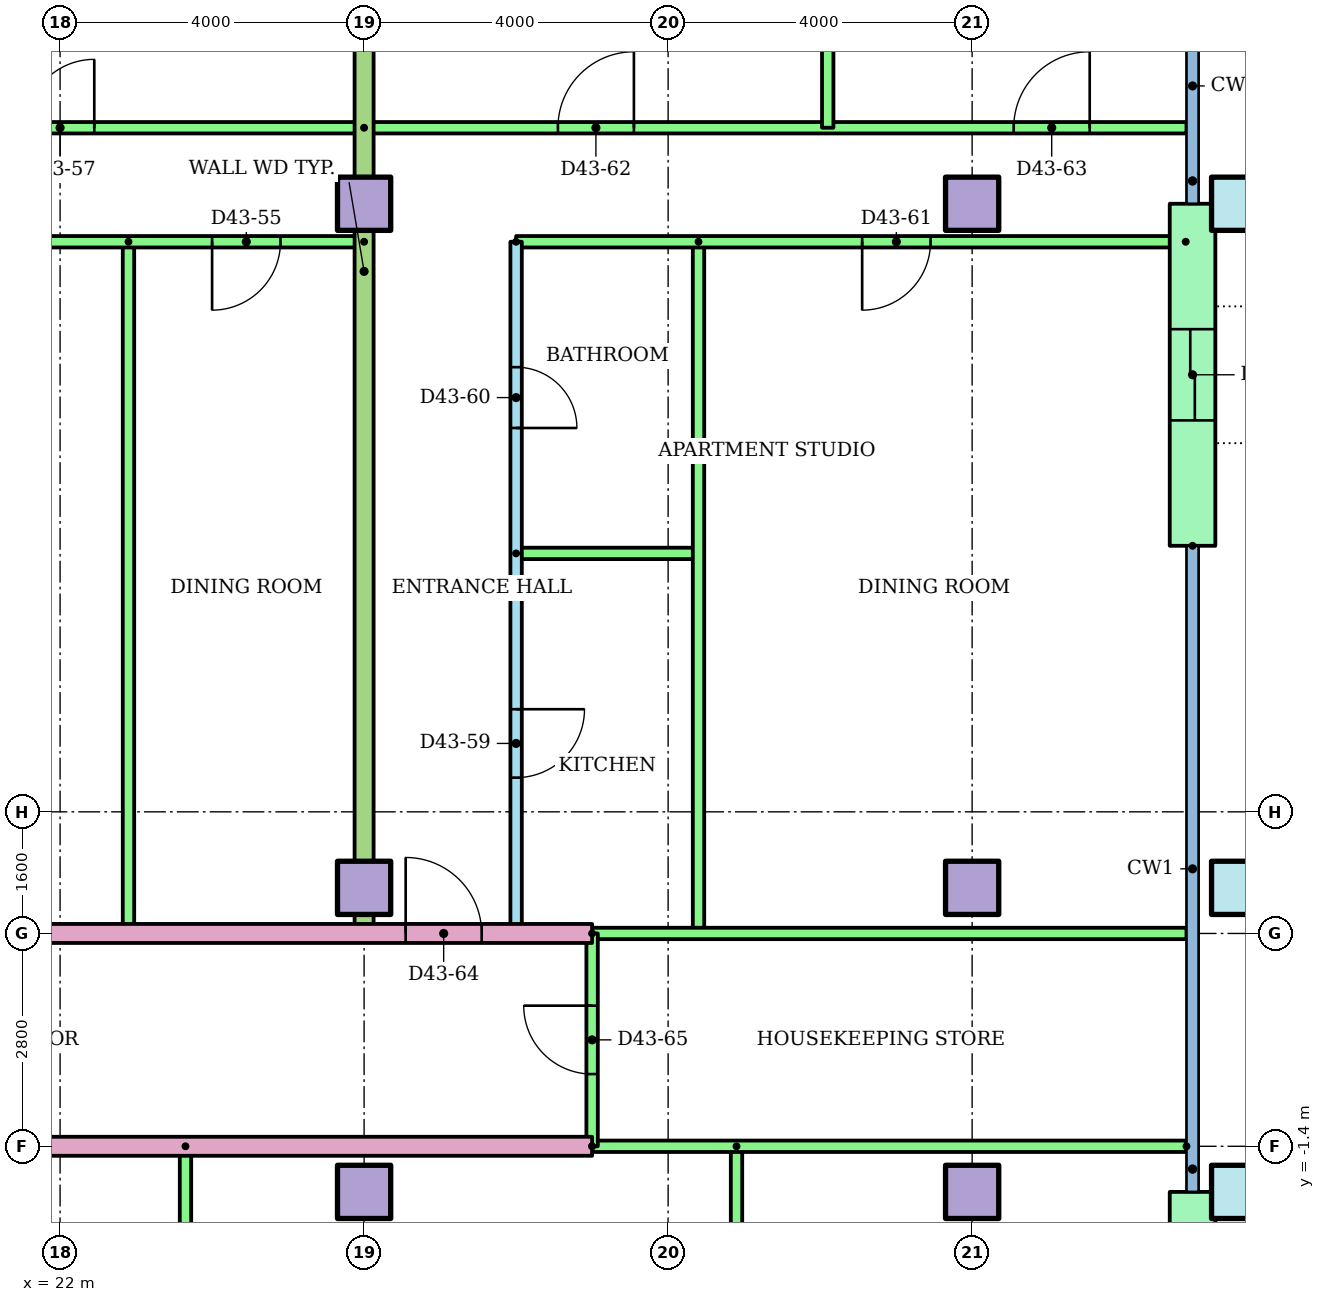
"""IFC4 building model, lengths in metres.
Left out: names, types, materials, properties, quantities, classifications, styles, units other than length and angle.
Written with IfcOpenShell. Run it as: python <this file> out.ifc"""

import sys

from ifc_helpers import new_model, si_unit, direction, frame, frame_2d, origin, origin_2d, place, context, subcontext, project, spatial, rectangle, hollow_rectangle, extrude, element, fill, save


model = new_model("IFC4")
c1 = context("Model", 3, precision=1e-05, world=origin(), true_north=direction((0.0, 1.0)))
c2 = subcontext(c1, "Body", "Model", "MODEL_VIEW")
j1 = project(units=[si_unit("LENGTHUNIT", "METRE"), si_unit("PLANEANGLEUNIT", "RADIAN")], contexts=[c1])
p1 = place(None, origin())
s1 = spatial("IfcSite", under=j1, at=p1, CompositionType="ELEMENT")
p2 = place(p1, origin())
s2 = spatial("IfcBuilding", under=s1, at=p2, CompositionType="ELEMENT")
p3 = place(p2, frame((0.0, 0.0, 168.5)))
s3 = spatial("IfcBuildingStorey", under=s2, at=p3, CompositionType="ELEMENT", Elevation=168.5)
for number, where in (
    (1, (26.0, -2.0, 0.0)),
    (2, (34.0, -2.0, 0.0)),
):
    element("IfcColumn", number, at=place(p3, frame(where)), inside=s3, PredefinedType="COLUMN", context=c2, shape_type="SweptSolid", body=[
        extrude(rectangle(XDim=0.7, YDim=0.7, at=origin_2d()), origin(), (0.0, 0.0, 1.0), 3.2),
    ])
p4 = place(p3, frame((37.5, -2.0, 0.0)))
e3 = element("IfcColumn", 3, at=p4, inside=s3, PredefinedType="COLUMN", context=c2, shape_type="SweptSolid", body=[
    extrude(hollow_rectangle(XDim=0.7, YDim=0.7, WallThickness=0.036, at=origin_2d()), origin(), (0.0, 0.0, 1.0), 3.2),
])
for number, where in (
    (4, (26.0, 2.0, 0.0)),
    (5, (34.0, 2.0, 0.0)),
):
    element("IfcColumn", number, at=place(p3, frame(where)), inside=s3, PredefinedType="COLUMN", context=c2, shape_type="SweptSolid", body=[
        extrude(rectangle(XDim=0.7, YDim=0.7, at=origin_2d()), origin(), (0.0, 0.0, 1.0), 3.2),
    ])
p5 = place(p3, frame((37.5, 2.0, 0.0)))
e6 = element("IfcColumn", 6, at=p5, inside=s3, PredefinedType="COLUMN", context=c2, shape_type="SweptSolid", body=[
    extrude(hollow_rectangle(XDim=0.7, YDim=0.7, WallThickness=0.036, at=origin_2d()), origin(), (0.0, 0.0, 1.0), 3.2),
])
for number, where in (
    (7, (26.0, 11.0, 0.0)),
    (8, (34.0, 11.0, 0.0)),
):
    element("IfcColumn", number, at=place(p3, frame(where)), inside=s3, PredefinedType="COLUMN", context=c2, shape_type="SweptSolid", body=[
        extrude(rectangle(XDim=0.7, YDim=0.7, at=origin_2d()), origin(), (0.0, 0.0, 1.0), 3.2),
    ])
p6 = place(p3, frame((37.5, 11.0, 0.0)))
e9 = element("IfcColumn", 9, at=p6, inside=s3, PredefinedType="COLUMN", context=c2, shape_type="SweptSolid", body=[
    extrude(hollow_rectangle(XDim=0.7, YDim=0.7, WallThickness=0.036, at=origin_2d()), origin(), (0.0, 0.0, 1.0), 3.2),
])
p7 = place(p3, frame((36.9, -5.7, 0.0), z_axis=(0.0, 0.0, 1.0), x_axis=(0.0, 1.0, 0.0)))
e10 = element("IfcWall", 10, at=p7, inside=s3, PredefinedType="STANDARD", context=c2, shape_type="SweptSolid", body=[
    extrude(rectangle(XDim=3.7, YDim=0.6, at=frame_2d((1.85, 0.0))), origin(), (0.0, 0.0, 1.0), 2.92),
])
p8 = place(p7, frame((1.25, 0.0, 0.0)))
e11 = element("IfcOpeningElement", 11, at=p8, cuts=e10, PredefinedType="OPENING", context=c2, shape_type="SweptSolid", body=[
    extrude(rectangle(XDim=1.2, YDim=2.1, at=frame_2d((0.6, 1.05))), frame((0.0, 0.31, 0.0), z_axis=(0.0, -1.0, 0.0), x_axis=(1.0, 0.0, 0.0)), (0.0, 0.0, 1.0), 0.62),
])
p9 = place(p3, frame((36.9, 6.5, 0.0), z_axis=(0.0, 0.0, 1.0), x_axis=(0.0, 1.0, 0.0)))
e12 = element("IfcWall", 12, at=p9, inside=s3, PredefinedType="STANDARD", context=c2, shape_type="SweptSolid", body=[
    extrude(rectangle(XDim=4.5, YDim=0.6, at=frame_2d((2.25, 0.0))), origin(), (0.0, 0.0, 1.0), 2.92),
])
p10 = place(p9, frame((1.65, 0.0, 0.0)))
e13 = element("IfcOpeningElement", 13, at=p10, cuts=e12, PredefinedType="OPENING", context=c2, shape_type="SweptSolid", body=[
    extrude(rectangle(XDim=1.2, YDim=2.1, at=frame_2d((0.6, 1.05))), frame((0.0, 0.31, 0.0), z_axis=(0.0, -1.0, 0.0), x_axis=(1.0, 0.0, 0.0)), (0.0, 0.0, 1.0), 0.62),
])
for number, where, z_axis, x_axis in (
    (14, (23.65, -1.4, 0.0), (0.0, 0.0, 1.0), (0.0, -1.0, 0.0)),
    (15, (30.9, -1.4, 0.0), (0.0, 0.0, 1.0), (0.0, -1.0, 0.0)),
):
    element("IfcWall", number, at=place(p3, frame(where, z_axis=z_axis, x_axis=x_axis)), inside=s3, PredefinedType="PARTITIONING", context=c2, shape_type="SweptSolid", body=[
        extrude(rectangle(XDim=6.7, YDim=0.15, at=frame_2d((3.35, 0.0))), origin(), (0.0, 0.0, 1.0), 2.4),
    ])
p11 = place(p3, frame((29.0, -1.4, 0.0), z_axis=(0.0, 0.0, 1.0), x_axis=(-1.0, 0.0, 0.0)))
e16 = element("IfcWall", 16, at=p11, inside=s3, PredefinedType="PARTITIONING", context=c2, shape_type="SweptSolid", body=[
    extrude(rectangle(XDim=15.0, YDim=0.25, at=frame_2d((7.5, 0.0))), origin(), (0.0, 0.0, 1.0), 2.4),
])
p12 = place(p3, frame((36.82, -1.4, 0.0), z_axis=(0.0, 0.0, 1.0), x_axis=(-1.0, 0.0, 0.0)))
e17 = element("IfcWall", 17, at=p12, inside=s3, PredefinedType="PARTITIONING", context=c2, shape_type="SweptSolid", body=[
    extrude(rectangle(XDim=7.82, YDim=0.15, at=frame_2d((3.91, 0.0))), origin(), (0.0, 0.0, 1.0), 2.4),
])
p13 = place(p3, frame((22.9, 10.5, 0.0), z_axis=(0.0, 0.0, 1.0), x_axis=(0.0, -1.0, 0.0)))
e18 = element("IfcWall", 18, at=p13, inside=s3, PredefinedType="PARTITIONING", context=c2, shape_type="SweptSolid", body=[
    extrude(rectangle(XDim=9.1, YDim=0.15, at=frame_2d((4.55, 0.0))), origin(), (0.0, 0.0, 1.0), 2.4),
])
p14 = place(p3, frame((26.0, 10.5, 0.0), z_axis=(0.0, 0.0, 1.0), x_axis=(-1.0, 0.0, 0.0)))
e19 = element("IfcWall", 19, at=p14, inside=s3, PredefinedType="PARTITIONING", context=c2, shape_type="SweptSolid", body=[
    extrude(rectangle(XDim=10.0, YDim=0.15, at=frame_2d((5.0, 0.0))), origin(), (0.0, 0.0, 1.0), 2.4),
])
p15 = place(p14, frame((4.9, 0.0, 0.0)))
e20 = element("IfcOpeningElement", 20, at=p15, cuts=e19, PredefinedType="OPENING", context=c2, shape_type="SweptSolid", body=[
    extrude(rectangle(XDim=0.9, YDim=2.1, at=frame_2d((0.45, 1.05))), frame((0.0, 0.085, 0.0), z_axis=(0.0, -1.0, 0.0), x_axis=(1.0, 0.0, 0.0)), (0.0, 0.0, 1.0), 0.17),
])
p16 = place(p14, frame((1.1, 0.0, 0.0)))
e21 = element("IfcOpeningElement", 21, at=p16, cuts=e19, PredefinedType="OPENING", context=c2, shape_type="SweptSolid", body=[
    extrude(rectangle(XDim=0.9, YDim=2.1, at=frame_2d((0.45, 1.05))), frame((0.0, 0.085, 0.0), z_axis=(0.0, -1.0, 0.0), x_axis=(1.0, 0.0, 0.0)), (0.0, 0.0, 1.0), 0.17),
])
p17 = place(p3, frame((14.0, 12.0, 0.0)))
e22 = element("IfcWall", 22, at=p17, inside=s3, PredefinedType="PARTITIONING", context=c2, shape_type="SweptSolid", body=[
    extrude(rectangle(XDim=12.0, YDim=0.15, at=frame_2d((6.0, 0.0))), origin(), (0.0, 0.0, 1.0), 2.4),
])
p18 = place(p17, frame((1.5, 0.0, 0.0)))
e23 = element("IfcOpeningElement", 23, at=p18, cuts=e22, PredefinedType="OPENING", context=c2, shape_type="SweptSolid", body=[
    extrude(rectangle(XDim=1.0, YDim=2.1, at=frame_2d((0.5, 1.05))), frame((0.0, 0.085, 0.0), z_axis=(0.0, -1.0, 0.0), x_axis=(1.0, 0.0, 0.0)), (0.0, 0.0, 1.0), 0.17),
])
p19 = place(p17, frame((7.55, 0.0, 0.0)))
e24 = element("IfcOpeningElement", 24, at=p19, cuts=e22, PredefinedType="OPENING", context=c2, shape_type="SweptSolid", body=[
    extrude(rectangle(XDim=0.9, YDim=2.1, at=frame_2d((0.45, 1.05))), frame((0.0, 0.085, 0.0), z_axis=(0.0, -1.0, 0.0), x_axis=(1.0, 0.0, 0.0)), (0.0, 0.0, 1.0), 0.17),
])
p20 = place(p3, frame((28.0, 10.5, 0.0), z_axis=(0.0, 0.0, 1.0), x_axis=(0.0, -1.0, 0.0)))
e25 = element("IfcWall", 25, at=p20, inside=s3, PredefinedType="PARTITIONING", context=c2, shape_type="SweptSolid", body=[
    extrude(rectangle(XDim=9.1, YDim=0.15, at=frame_2d((4.55, 0.0))), origin(), (0.0, 0.0, 1.0), 2.4),
])
p21 = place(p20, frame((6.15, 0.0, 0.0)))
e26 = element("IfcOpeningElement", 26, at=p21, cuts=e25, PredefinedType="OPENING", context=c2, shape_type="SweptSolid", body=[
    extrude(rectangle(XDim=0.9, YDim=2.1, at=frame_2d((0.45, 1.05))), frame((0.0, 0.085, 0.0), z_axis=(0.0, -1.0, 0.0), x_axis=(1.0, 0.0, 0.0)), (0.0, 0.0, 1.0), 0.17),
])
p22 = place(p20, frame((1.65, 0.0, 0.0)))
e27 = element("IfcOpeningElement", 27, at=p22, cuts=e25, PredefinedType="OPENING", context=c2, shape_type="SweptSolid", body=[
    extrude(rectangle(XDim=0.8, YDim=2.1, at=frame_2d((0.4, 1.05))), frame((0.0, 0.085, 0.0), z_axis=(0.0, -1.0, 0.0), x_axis=(1.0, 0.0, 0.0)), (0.0, 0.0, 1.0), 0.17),
])
p23 = place(p3, frame((28.0, 6.4, 0.0)))
e28 = element("IfcWall", 28, at=p23, inside=s3, PredefinedType="PARTITIONING", context=c2, shape_type="SweptSolid", body=[
    extrude(rectangle(XDim=2.4, YDim=0.15, at=frame_2d((1.2, 0.0))), origin(), (0.0, 0.0, 1.0), 2.4),
])
p24 = place(p3, frame((30.4, 10.5, 0.0), z_axis=(0.0, 0.0, 1.0), x_axis=(0.0, -1.0, 0.0)))
e29 = element("IfcWall", 29, at=p24, inside=s3, PredefinedType="PARTITIONING", context=c2, shape_type="SweptSolid", body=[
    extrude(rectangle(XDim=9.1, YDim=0.15, at=frame_2d((4.55, 0.0))), origin(), (0.0, 0.0, 1.0), 2.4),
])
p25 = place(p3, frame((36.81, 10.5, 0.0), z_axis=(0.0, 0.0, 1.0), x_axis=(-1.0, 0.0, 0.0)))
e30 = element("IfcWall", 30, at=p25, inside=s3, PredefinedType="PARTITIONING", context=c2, shape_type="SweptSolid", body=[
    extrude(rectangle(XDim=8.81, YDim=0.15, at=frame_2d((4.405, 0.0))), origin(), (0.0, 0.0, 1.0), 2.4),
])
p26 = place(p25, frame((3.357, 0.0, 0.0)))
e31 = element("IfcOpeningElement", 31, at=p26, cuts=e30, PredefinedType="OPENING", context=c2, shape_type="SweptSolid", body=[
    extrude(rectangle(XDim=0.9, YDim=2.1, at=frame_2d((0.45, 1.05))), frame((0.0, 0.085, 0.0), z_axis=(0.0, -1.0, 0.0), x_axis=(1.0, 0.0, 0.0)), (0.0, 0.0, 1.0), 0.17),
])
p27 = place(p3, frame((26.0, 12.0, 0.0)))
e32 = element("IfcWall", 32, at=p27, inside=s3, PredefinedType="PARTITIONING", context=c2, shape_type="SweptSolid", body=[
    extrude(rectangle(XDim=10.82, YDim=0.15, at=frame_2d((5.41, 0.0))), origin(), (0.0, 0.0, 1.0), 2.4),
])
p28 = place(p27, frame((2.55, 0.0, 0.0)))
e33 = element("IfcOpeningElement", 33, at=p28, cuts=e32, PredefinedType="OPENING", context=c2, shape_type="SweptSolid", body=[
    extrude(rectangle(XDim=1.0, YDim=2.1, at=frame_2d((0.5, 1.05))), frame((0.0, 0.085, 0.0), z_axis=(0.0, -1.0, 0.0), x_axis=(1.0, 0.0, 0.0)), (0.0, 0.0, 1.0), 0.17),
])
p29 = place(p27, frame((8.547, 0.0, 0.0)))
e34 = element("IfcOpeningElement", 34, at=p29, cuts=e32, PredefinedType="OPENING", context=c2, shape_type="SweptSolid", body=[
    extrude(rectangle(XDim=1.0, YDim=2.1, at=frame_2d((0.5, 1.05))), frame((0.0, 0.085, 0.0), z_axis=(0.0, -1.0, 0.0), x_axis=(1.0, 0.0, 0.0)), (0.0, 0.0, 1.0), 0.17),
])
p30 = place(p3, frame((32.1, 17.02, 0.0), z_axis=(0.0, 0.0, 1.0), x_axis=(0.0, -1.0, 0.0)))
e35 = element("IfcWall", 35, at=p30, inside=s3, PredefinedType="PARTITIONING", context=c2, shape_type="SweptSolid", body=[
    extrude(rectangle(XDim=5.02, YDim=0.15, at=frame_2d((2.51, 0.0))), origin(), (0.0, 0.0, 1.0), 2.4),
])
p31 = place(p3, frame((26.0, 18.821, 0.0), z_axis=(0.0, 0.0, 1.0), x_axis=(0.0, -1.0, 0.0)))
e36 = element("IfcWall", 36, at=p31, inside=s3, PredefinedType="PARTITIONING", context=c2, shape_type="SweptSolid", body=[
    extrude(rectangle(XDim=17.421, YDim=0.25, at=frame_2d((8.71, 0.0))), origin(), (0.0, 0.0, 1.0), 2.4),
])
p32 = place(p3, frame((14.0, 1.4, 0.0)))
e37 = element("IfcWall", 37, at=p32, inside=s3, PredefinedType="PARTITIONING", context=c2, shape_type="SweptSolid", body=[
    extrude(rectangle(XDim=15.0, YDim=0.25, at=frame_2d((7.5, 0.0))), origin(), (0.0, 0.0, 1.0), 2.4),
])
p33 = place(p32, frame((0.5, 0.0, 0.0)))
e38 = element("IfcOpeningElement", 38, at=p33, cuts=e37, PredefinedType="OPENING", context=c2, shape_type="SweptSolid", body=[
    extrude(rectangle(XDim=1.0, YDim=2.1, at=frame_2d((0.5, 1.05))), frame((0.0, 0.135, 0.0), z_axis=(0.0, -1.0, 0.0), x_axis=(1.0, 0.0, 0.0)), (0.0, 0.0, 1.0), 0.27),
])
p34 = place(p32, frame((12.547, 0.0, 0.0)))
e39 = element("IfcOpeningElement", 39, at=p34, cuts=e37, PredefinedType="OPENING", context=c2, shape_type="SweptSolid", body=[
    extrude(rectangle(XDim=1.0, YDim=2.1, at=frame_2d((0.5, 1.05))), frame((0.0, 0.135, 0.0), z_axis=(0.0, -1.0, 0.0), x_axis=(1.0, 0.0, 0.0)), (0.0, 0.0, 1.0), 0.27),
])
p35 = place(p3, frame((29.0, 1.4, 0.0)))
e40 = element("IfcWall", 40, at=p35, inside=s3, PredefinedType="PARTITIONING", context=c2, shape_type="SweptSolid", body=[
    extrude(rectangle(XDim=7.82, YDim=0.15, at=frame_2d((3.91, 0.0))), origin(), (0.0, 0.0, 1.0), 2.4),
])
p36 = place(p3, frame((29.0, -1.4, 0.0), z_axis=(0.0, 0.0, 1.0), x_axis=(0.0, 1.0, 0.0)))
e41 = element("IfcWall", 41, at=p36, inside=s3, PredefinedType="PARTITIONING", context=c2, shape_type="SweptSolid", body=[
    extrude(rectangle(XDim=2.8, YDim=0.15, at=frame_2d((1.4, 0.0))), origin(), (0.0, 0.0, 1.0), 2.4),
])
p37 = place(p36, frame((0.95, 0.0, 0.0)))
e42 = element("IfcOpeningElement", 42, at=p37, cuts=e41, PredefinedType="OPENING", context=c2, shape_type="SweptSolid", body=[
    extrude(rectangle(XDim=0.9, YDim=2.1, at=frame_2d((0.45, 1.05))), frame((0.0, 0.085, 0.0), z_axis=(0.0, -1.0, 0.0), x_axis=(1.0, 0.0, 0.0)), (0.0, 0.0, 1.0), 0.17),
])
p38 = place(p16, origin())
e43 = element("IfcDoor", 43, at=p38, inside=s3, OperationType="SINGLE_SWING_RIGHT", PredefinedType="DOOR", context=c2, shape_type="SweptSolid", body=[
    extrude(rectangle(XDim=0.9, YDim=2.1, at=frame_2d((0.45, 1.05))), frame((0.0, 0.025, 0.0), z_axis=(0.0, -1.0, 0.0), x_axis=(1.0, 0.0, 0.0)), (0.0, 0.0, 1.0), 0.05),
])
fill(e21, e43)
p39 = place(p19, origin())
e44 = element("IfcDoor", 44, at=p39, inside=s3, OperationType="SINGLE_SWING_RIGHT", PredefinedType="DOOR", context=c2, shape_type="SweptSolid", body=[
    extrude(rectangle(XDim=0.9, YDim=2.1, at=frame_2d((0.45, 1.05))), frame((0.0, 0.025, 0.0), z_axis=(0.0, -1.0, 0.0), x_axis=(1.0, 0.0, 0.0)), (0.0, 0.0, 1.0), 0.05),
])
fill(e24, e44)
p40 = place(p21, origin())
e45 = element("IfcDoor", 45, at=p40, inside=s3, OperationType="SINGLE_SWING_LEFT", PredefinedType="DOOR", context=c2, shape_type="SweptSolid", body=[
    extrude(rectangle(XDim=0.9, YDim=2.1, at=frame_2d((0.45, 1.05))), frame((0.0, 0.025, 0.0), z_axis=(0.0, -1.0, 0.0), x_axis=(1.0, 0.0, 0.0)), (0.0, 0.0, 1.0), 0.05),
])
fill(e26, e45)
p41 = place(p22, origin())
e46 = element("IfcDoor", 46, at=p41, inside=s3, OperationType="SINGLE_SWING_RIGHT", PredefinedType="DOOR", context=c2, shape_type="SweptSolid", body=[
    extrude(rectangle(XDim=0.8, YDim=2.1, at=frame_2d((0.4, 1.05))), frame((0.0, 0.025, 0.0), z_axis=(0.0, -1.0, 0.0), x_axis=(1.0, 0.0, 0.0)), (0.0, 0.0, 1.0), 0.05),
])
fill(e27, e46)
p42 = place(p26, origin())
e47 = element("IfcDoor", 47, at=p42, inside=s3, OperationType="SINGLE_SWING_RIGHT", PredefinedType="DOOR", context=c2, shape_type="SweptSolid", body=[
    extrude(rectangle(XDim=0.9, YDim=2.1, at=frame_2d((0.45, 1.05))), frame((0.0, 0.025, 0.0), z_axis=(0.0, -1.0, 0.0), x_axis=(1.0, 0.0, 0.0)), (0.0, 0.0, 1.0), 0.05),
])
fill(e31, e47)
p43 = place(p28, origin())
e48 = element("IfcDoor", 48, at=p43, inside=s3, OperationType="SINGLE_SWING_RIGHT", PredefinedType="DOOR", context=c2, shape_type="SweptSolid", body=[
    extrude(rectangle(XDim=1.0, YDim=2.1, at=frame_2d((0.5, 1.05))), frame((0.0, 0.025, 0.0), z_axis=(0.0, -1.0, 0.0), x_axis=(1.0, 0.0, 0.0)), (0.0, 0.0, 1.0), 0.05),
])
fill(e33, e48)
p44 = place(p29, origin())
e49 = element("IfcDoor", 49, at=p44, inside=s3, OperationType="SINGLE_SWING_RIGHT", PredefinedType="DOOR", context=c2, shape_type="SweptSolid", body=[
    extrude(rectangle(XDim=1.0, YDim=2.1, at=frame_2d((0.5, 1.05))), frame((0.0, 0.025, 0.0), z_axis=(0.0, -1.0, 0.0), x_axis=(1.0, 0.0, 0.0)), (0.0, 0.0, 1.0), 0.05),
])
fill(e34, e49)
p45 = place(p34, origin())
e50 = element("IfcDoor", 50, at=p45, inside=s3, OperationType="SINGLE_SWING_LEFT", PredefinedType="DOOR", context=c2, shape_type="SweptSolid", body=[
    extrude(rectangle(XDim=1.0, YDim=2.1, at=frame_2d((0.5, 1.05))), frame((0.0, 0.025, 0.0), z_axis=(0.0, -1.0, 0.0), x_axis=(1.0, 0.0, 0.0)), (0.0, 0.0, 1.0), 0.05),
])
fill(e39, e50)
p46 = place(p37, origin())
e51 = element("IfcDoor", 51, at=p46, inside=s3, OperationType="SINGLE_SWING_RIGHT", PredefinedType="DOOR", context=c2, shape_type="SweptSolid", body=[
    extrude(rectangle(XDim=0.9, YDim=2.1, at=frame_2d((0.45, 1.05))), frame((0.0, 0.025, 0.0), z_axis=(0.0, -1.0, 0.0), x_axis=(1.0, 0.0, 0.0)), (0.0, 0.0, 1.0), 0.05),
])
fill(e42, e51)
p47 = place(p10, origin())
e52 = element("IfcDoor", 52, at=p47, inside=s3, OperationType="SLIDING_TO_LEFT", PredefinedType="DOOR", context=c2, shape_type="SweptSolid", body=[
    extrude(rectangle(XDim=1.2, YDim=2.1, at=frame_2d((0.6, 1.05))), frame((0.0, 0.025, 0.0), z_axis=(0.0, -1.0, 0.0), x_axis=(1.0, 0.0, 0.0)), (0.0, 0.0, 1.0), 0.05),
])
fill(e13, e52)
save(model, sys.argv[1])
